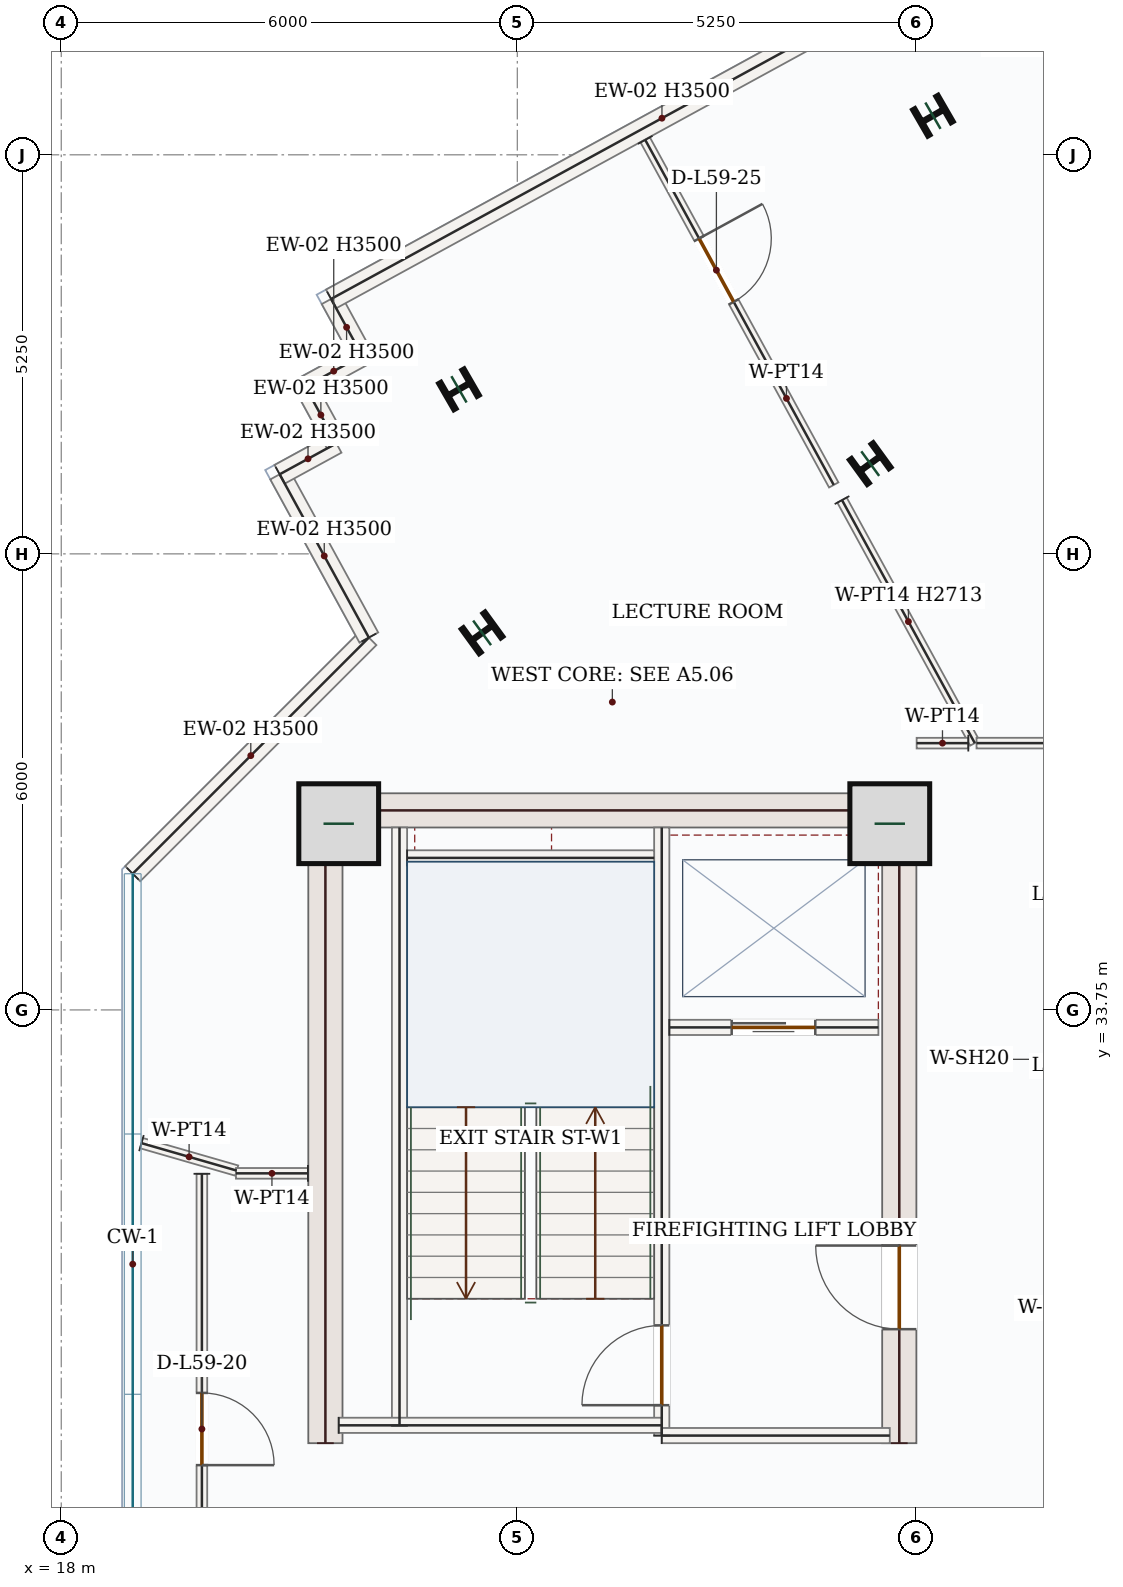
"""IFC4 building model, lengths in metres.
Left out: names, types, materials, properties, quantities, classifications, styles, units other than length and angle.
Written with IfcOpenShell. Run it as: python <this file> out.ifc"""

import sys

from ifc_helpers import new_model, si_unit, direction, frame, frame_2d, origin, origin_2d, place, context, subcontext, project, spatial, rectangle, i_section, extrude, source, transform, mapped, element, fill, save


model = new_model("IFC4")
c1 = context("Model", 3, precision=1e-05, world=origin(), true_north=direction((0.0, 1.0)))
c2 = subcontext(c1, "Body", "Model", "MODEL_VIEW")
j1 = project(units=[si_unit("LENGTHUNIT", "METRE"), si_unit("PLANEANGLEUNIT", "RADIAN")], contexts=[c1])
p1 = place(None, origin())
s1 = spatial("IfcSite", under=j1, at=p1, CompositionType="ELEMENT")
p2 = place(p1, origin())
s2 = spatial("IfcBuilding", under=s1, at=p2, CompositionType="ELEMENT")
p3 = place(p2, frame((0.0, 0.0, 250.35)))
s3 = spatial("IfcBuildingStorey", under=s2, at=p3, CompositionType="ELEMENT", Elevation=250.35)
m1 = source(origin(), c2, "Body", "SweptSolid", [
    extrude(rectangle(XDim=8.55, YDim=0.45, at=frame_2d((4.275, 0.0))), origin(), (0.0, 0.0, 1.0), 3.5),
])
p4 = place(p3, frame((21.475, 28.05, 0.0), z_axis=(0.0, 0.0, 1.0), x_axis=(0.0, 1.0, 0.0)))
e1 = element("IfcWall", 1, at=p4, inside=s3, PredefinedType="SHEAR", context=c2, shape_type="MappedRepresentation", body=[
    mapped(m1, transform((0.0, 0.0, 0.0), x_axis=(1.0, 0.0, 0.0), y_axis=(0.0, 1.0, 0.0), z_axis=(0.0, 0.0, 1.0), scale=1.0)),
])
p5 = place(p3, frame((29.025, 28.05, 0.0), z_axis=(0.0, 0.0, 1.0), x_axis=(0.0, 1.0, 0.0)))
e2 = element("IfcWall", 2, at=p5, inside=s3, PredefinedType="SHEAR", context=c2, shape_type="SweptSolid", body=[
    extrude(rectangle(XDim=8.55, YDim=0.45, at=frame_2d((4.275, 0.0))), origin(), (0.0, 0.0, 1.0), 3.5),
])
p6 = place(p5, frame((1.5, 0.0, 0.0)))
e3 = element("IfcOpeningElement", 3, at=p6, cuts=e2, PredefinedType="OPENING", context=c2, shape_type="SweptSolid", body=[
    extrude(rectangle(XDim=1.1, YDim=2.2, at=frame_2d((0.55, 1.1))), frame((0.0, 0.235, 0.0), z_axis=(0.0, -1.0, 0.0), x_axis=(1.0, 0.0, 0.0)), (0.0, 0.0, 1.0), 0.47),
])
m2 = source(origin(), c2, "Body", "SweptSolid", [
    extrude(rectangle(XDim=7.1, YDim=0.45, at=frame_2d((3.55, 0.0))), origin(), (0.0, 0.0, 1.0), 3.5),
])
p7 = place(p3, frame((21.7, 36.375, 0.0), z_axis=(0.0, 0.0, 1.0), x_axis=(1.0, 0.0, 0.0)))
e4 = element("IfcWall", 4, at=p7, inside=s3, PredefinedType="SHEAR", context=c2, shape_type="MappedRepresentation", body=[
    mapped(m2, transform((0.0, 0.0, 0.0), x_axis=(1.0, 0.0, 0.0), y_axis=(0.0, 1.0, 0.0), z_axis=(0.0, 0.0, 1.0), scale=1.0)),
])
m3 = source(origin(), c2, "Body", "SweptSolid", [
    extrude(rectangle(XDim=1.05, YDim=1.05, at=origin_2d()), origin(), (0.0, 0.0, 1.0), 3.75),
])
for number, where, z_axis, x_axis in (
    (5, (21.65, 36.2, 0.0), (0.0, 0.0, 1.0), (1.0, 0.0, 0.0)),
    (6, (28.9, 36.2, 0.0), (0.0, 0.0, 1.0), (1.0, 0.0, 0.0)),
):
    element("IfcColumn", number, at=place(p3, frame(where, z_axis=z_axis, x_axis=x_axis)), inside=s3, PredefinedType="COLUMN", context=c2, shape_type="MappedRepresentation", body=[
        mapped(m3, transform((0.0, 0.0, 0.0), x_axis=(1.0, 0.0, 0.0), y_axis=(0.0, 1.0, 0.0), z_axis=(0.0, 0.0, 1.0), scale=1.0)),
    ])
m4 = source(origin(), c2, "Body", "SweptSolid", [
    extrude(i_section(OverallWidth=0.399, OverallDepth=0.386, WebThickness=0.021, FlangeThickness=0.033, FilletRadius=0.018, at=origin_2d()), origin(), (0.0, 0.0, 1.0), 3.75),
])
for number, where, z_axis, x_axis in (
    (7, (28.643, 40.937, 0.0), (0.0, 0.0, 1.0), (-0.588, 0.809, 0.0)),
    (8, (23.536, 38.711, 0.0), (0.0, 0.0, 1.0), (-0.588, 0.809, 0.0)),
    (9, (29.468, 45.514, 0.0), (0.0, 0.0, 1.0), (-0.5, 0.866, 0.0)),
    (10, (23.232, 41.914, 0.0), (0.0, 0.0, 1.0), (-0.5, 0.866, 0.0)),
):
    element("IfcColumn", number, at=place(p3, frame(where, z_axis=z_axis, x_axis=x_axis)), inside=s3, PredefinedType="COLUMN", context=c2, shape_type="MappedRepresentation", body=[
        mapped(m4, transform((0.0, 0.0, 0.0), x_axis=(1.0, 0.0, 0.0), y_axis=(0.0, 1.0, 0.0), z_axis=(0.0, 0.0, 1.0), scale=1.0)),
    ])
m5 = source(origin(), c2, "Body", "SweptSolid", [
    extrude(rectangle(XDim=4.394, YDim=0.28, at=frame_2d((2.197, 0.0))), origin(), (0.0, 0.0, 1.0), 3.5),
])
p8 = place(p3, frame((18.94, 35.542, 0.0), z_axis=(0.0, 0.0, 1.0), x_axis=(0.707106781187, 0.707106781187, 0.0)))
e11 = element("IfcWall", 11, at=p8, inside=s3, PredefinedType="SOLIDWALL", context=c2, shape_type="MappedRepresentation", body=[
    mapped(m5, transform((0.0, 0.0, 0.0), x_axis=(1.0, 0.0, 0.0), y_axis=(0.0, 1.0, 0.0), z_axis=(0.0, 0.0, 1.0), scale=1.0)),
])
m6 = source(origin(), c2, "Body", "SweptSolid", [
    extrude(rectangle(XDim=2.448, YDim=0.28, at=frame_2d((1.224, 0.0))), origin(), (0.0, 0.0, 1.0), 3.5),
])
p9 = place(p3, frame((22.047, 38.649, 0.0), z_axis=(0.0, 0.0, 1.0), x_axis=(-0.47951595933, 0.877533158774, 0.0)))
e12 = element("IfcWall", 12, at=p9, inside=s3, PredefinedType="SOLIDWALL", context=c2, shape_type="MappedRepresentation", body=[
    mapped(m6, transform((0.0, 0.0, 0.0), x_axis=(1.0, 0.0, 0.0), y_axis=(0.0, 1.0, 0.0), z_axis=(0.0, 0.0, 1.0), scale=1.0)),
])
m7 = source(origin(), c2, "Body", "SweptSolid", [
    extrude(rectangle(XDim=0.85, YDim=0.28, at=frame_2d((0.425, 0.0))), origin(), (0.0, 0.0, 1.0), 3.5),
])
p10 = place(p3, frame((20.873, 40.796, 0.0), z_axis=(0.0, 0.0, 1.0), x_axis=(0.87752219781, 0.479536017782, 0.0)))
e13 = element("IfcWall", 13, at=p10, inside=s3, PredefinedType="SOLIDWALL", context=c2, shape_type="MappedRepresentation", body=[
    mapped(m7, transform((0.0, 0.0, 0.0), x_axis=(1.0, 0.0, 0.0), y_axis=(0.0, 1.0, 0.0), z_axis=(0.0, 0.0, 1.0), scale=1.0)),
])
m8 = source(origin(), c2, "Body", "SweptSolid", [
    extrude(rectangle(XDim=0.85, YDim=0.28, at=frame_2d((0.425, 0.0))), origin(), (0.0, 0.0, 1.0), 3.5),
])
for number, where, z_axis, x_axis in (
    (14, (21.619, 41.204, 0.0), (0.0, 0.0, 1.0), (-0.48, 0.877, 0.0)),
    (15, (21.211, 41.95, 0.0), (0.0, 0.0, 1.0), (0.878, 0.479, 0.0)),
):
    element("IfcWall", number, at=place(p3, frame(where, z_axis=z_axis, x_axis=x_axis)), inside=s3, PredefinedType="SOLIDWALL", context=c2, shape_type="MappedRepresentation", body=[
        mapped(m8, transform((0.0, 0.0, 0.0), x_axis=(1.0, 0.0, 0.0), y_axis=(0.0, 1.0, 0.0), z_axis=(0.0, 0.0, 1.0), scale=1.0)),
    ])
p11 = place(p3, frame((21.958, 42.357, 0.0), z_axis=(0.0, 0.0, 1.0), x_axis=(-0.479536017782, 0.87752219781, 0.0)))
e16 = element("IfcWall", 16, at=p11, inside=s3, PredefinedType="SOLIDWALL", context=c2, shape_type="MappedRepresentation", body=[
    mapped(m7, transform((0.0, 0.0, 0.0), x_axis=(1.0, 0.0, 0.0), y_axis=(0.0, 1.0, 0.0), z_axis=(0.0, 0.0, 1.0), scale=1.0)),
])
m9 = source(origin(), c2, "Body", "SweptSolid", [
    extrude(rectangle(XDim=9.92, YDim=0.28, at=frame_2d((4.96, 0.0))), origin(), (0.0, 0.0, 1.0), 3.5),
])
p12 = place(p3, frame((21.55, 43.104, 0.0), z_axis=(0.0, 0.0, 1.0), x_axis=(0.877572768104, 0.479443465574, 0.0)))
e17 = element("IfcWall", 17, at=p12, inside=s3, PredefinedType="SOLIDWALL", context=c2, shape_type="MappedRepresentation", body=[
    mapped(m9, transform((0.0, 0.0, 0.0), x_axis=(1.0, 0.0, 0.0), y_axis=(0.0, 1.0, 0.0), z_axis=(0.0, 0.0, 1.0), scale=1.0)),
])
m10 = source(origin(), c2, "Body", "SweptSolid", [
    extrude(rectangle(XDim=7.87, YDim=0.2, at=frame_2d((3.935, 0.0))), origin(), (0.0, 0.0, 1.0), 3.5),
])
p13 = place(p3, frame((22.45, 28.28, 0.0), z_axis=(0.0, 0.0, 1.0), x_axis=(0.0, 1.0, 0.0)))
e18 = element("IfcWall", 18, at=p13, inside=s3, PredefinedType="SOLIDWALL", context=c2, shape_type="MappedRepresentation", body=[
    mapped(m10, transform((0.0, 0.0, 0.0), x_axis=(1.0, 0.0, 0.0), y_axis=(0.0, 1.0, 0.0), z_axis=(0.0, 0.0, 1.0), scale=1.0)),
])
p14 = place(p3, frame((25.9, 28.15, 0.0), z_axis=(0.0, 0.0, 1.0), x_axis=(0.0, 1.0, 0.0)))
e19 = element("IfcWall", 19, at=p14, inside=s3, PredefinedType="SOLIDWALL", context=c2, shape_type="SweptSolid", body=[
    extrude(rectangle(XDim=8.0, YDim=0.2, at=frame_2d((4.0, 0.0))), origin(), (0.0, 0.0, 1.0), 3.5),
])
p15 = place(p14, frame((0.4, 0.0, 0.0)))
e20 = element("IfcOpeningElement", 20, at=p15, cuts=e19, PredefinedType="OPENING", context=c2, shape_type="SweptSolid", body=[
    extrude(rectangle(XDim=1.05, YDim=2.15, at=frame_2d((0.525, 1.075))), frame((0.0, 0.11, 0.0), z_axis=(0.0, -1.0, 0.0), x_axis=(1.0, 0.0, 0.0)), (0.0, 0.0, 1.0), 0.22),
])
m11 = source(origin(), c2, "Body", "SweptSolid", [
    extrude(rectangle(XDim=4.25, YDim=0.2, at=frame_2d((2.125, 0.0))), origin(), (0.0, 0.0, 1.0), 3.5),
])
p16 = place(p3, frame((21.65, 28.285, 0.0), z_axis=(0.0, 0.0, 1.0), x_axis=(1.0, 0.0, 0.0)))
e21 = element("IfcWall", 21, at=p16, inside=s3, PredefinedType="SOLIDWALL", context=c2, shape_type="MappedRepresentation", body=[
    mapped(m11, transform((0.0, 0.0, 0.0), x_axis=(1.0, 0.0, 0.0), y_axis=(0.0, 1.0, 0.0), z_axis=(0.0, 0.0, 1.0), scale=1.0)),
])
m12 = source(origin(), c2, "Body", "SweptSolid", [
    extrude(rectangle(XDim=3.0, YDim=0.2, at=frame_2d((1.5, 0.0))), origin(), (0.0, 0.0, 1.0), 3.5),
])
p17 = place(p3, frame((25.9, 28.15, 0.0), z_axis=(0.0, 0.0, 1.0), x_axis=(1.0, 0.0, 0.0)))
e22 = element("IfcWall", 22, at=p17, inside=s3, PredefinedType="SOLIDWALL", context=c2, shape_type="MappedRepresentation", body=[
    mapped(m12, transform((0.0, 0.0, 0.0), x_axis=(1.0, 0.0, 0.0), y_axis=(0.0, 1.0, 0.0), z_axis=(0.0, 0.0, 1.0), scale=1.0)),
])
m13 = source(origin(), c2, "Body", "SweptSolid", [
    extrude(rectangle(XDim=3.25, YDim=0.2, at=frame_2d((1.625, 0.0))), origin(), (0.0, 0.0, 1.0), 3.5),
])
p18 = place(p3, frame((22.55, 35.75, 0.0), z_axis=(0.0, 0.0, 1.0), x_axis=(1.0, 0.0, 0.0)))
e23 = element("IfcWall", 23, at=p18, inside=s3, PredefinedType="SOLIDWALL", context=c2, shape_type="MappedRepresentation", body=[
    mapped(m13, transform((0.0, 0.0, 0.0), x_axis=(1.0, 0.0, 0.0), y_axis=(0.0, 1.0, 0.0), z_axis=(0.0, 0.0, 1.0), scale=1.0)),
])
p19 = place(p3, frame((26.0, 33.52, 0.0), z_axis=(0.0, 0.0, 1.0), x_axis=(1.0, 0.0, 0.0)))
e24 = element("IfcWall", 24, at=p19, inside=s3, PredefinedType="SOLIDWALL", context=c2, shape_type="SweptSolid", body=[
    extrude(rectangle(XDim=2.75, YDim=0.2, at=frame_2d((1.375, 0.0))), origin(), (0.0, 0.0, 1.0), 3.5),
])
p20 = place(p19, frame((0.82, 0.0, 0.0)))
e25 = element("IfcOpeningElement", 25, at=p20, cuts=e24, PredefinedType="OPENING", context=c2, shape_type="SweptSolid", body=[
    extrude(rectangle(XDim=1.1, YDim=2.15, at=frame_2d((0.55, 1.075))), frame((0.0, 0.11, 0.0), z_axis=(0.0, -1.0, 0.0), x_axis=(1.0, 0.0, 0.0)), (0.0, 0.0, 1.0), 0.22),
])
m14 = source(origin(), c2, "Body", "SweptSolid", [
    extrude(rectangle(XDim=1.305, YDim=0.14, at=frame_2d((0.652, 0.0))), origin(), (0.0, 0.0, 1.0), 3.5),
])
p21 = place(p3, frame((19.055, 31.998, 0.0), z_axis=(0.0, 0.0, 1.0), x_axis=(0.960836047515, -0.2771174657, 0.0)))
e26 = element("IfcWall", 26, at=p21, inside=s3, PredefinedType="PARTITIONING", context=c2, shape_type="MappedRepresentation", body=[
    mapped(m14, transform((0.0, 0.0, 0.0), x_axis=(1.0, 0.0, 0.0), y_axis=(0.0, 1.0, 0.0), z_axis=(0.0, 0.0, 1.0), scale=1.0)),
])
p22 = place(p3, frame((19.85, 31.594, 0.0), z_axis=(0.0, 0.0, 1.0), x_axis=(2.657666e-05, -0.999999999647, 0.0)))
e27 = element("IfcWall", 27, at=p22, inside=s3, PredefinedType="PARTITIONING", context=c2, shape_type="SweptSolid", body=[
    extrude(rectangle(XDim=9.186, YDim=0.14, at=frame_2d((4.593, 0.0))), origin(), (0.0, 0.0, 1.0), 3.5),
])
p23 = place(p22, frame((2.883, 0.0, 0.0)))
e28 = element("IfcOpeningElement", 28, at=p23, cuts=e27, PredefinedType="OPENING", context=c2, shape_type="SweptSolid", body=[
    extrude(rectangle(XDim=0.95, YDim=2.15, at=frame_2d((0.475, 1.075))), frame((0.0, 0.08, 0.0), z_axis=(0.0, -1.0, 0.0), x_axis=(1.0, 0.0, 0.0)), (0.0, 0.0, 1.0), 0.16),
])
p24 = place(p3, frame((25.683, 45.196, 0.0), z_axis=(0.0, 0.0, 1.0), x_axis=(0.479427410708, -0.877581539153, 0.0)))
e29 = element("IfcWall", 29, at=p24, inside=s3, PredefinedType="PARTITIONING", context=c2, shape_type="SweptSolid", body=[
    extrude(rectangle(XDim=5.173, YDim=0.14, at=frame_2d((2.586, 0.0))), origin(), (0.0, 0.0, 1.0), 3.5),
])
p25 = place(p24, frame((1.478, 0.0, 0.0)))
e30 = element("IfcOpeningElement", 30, at=p25, cuts=e29, PredefinedType="OPENING", context=c2, shape_type="SweptSolid", body=[
    extrude(rectangle(XDim=0.95, YDim=2.15, at=frame_2d((0.475, 1.075))), frame((0.0, 0.08, 0.0), z_axis=(0.0, -1.0, 0.0), x_axis=(1.0, 0.0, 0.0)), (0.0, 0.0, 1.0), 0.16),
])
m15 = source(origin(), c2, "Body", "SweptSolid", [
    extrude(rectangle(XDim=3.644, YDim=0.14, at=frame_2d((1.822, 0.0))), origin(), (0.0, 0.0, 1.0), 2.713),
])
p26 = place(p3, frame((28.271, 40.457, 0.0), z_axis=(0.0, 0.0, 1.0), x_axis=(0.479509272429, -0.877536812706, 0.0)))
e31 = element("IfcWall", 31, at=p26, inside=s3, PredefinedType="PARTITIONING", context=c2, shape_type="MappedRepresentation", body=[
    mapped(m15, transform((0.0, 0.0, 0.0), x_axis=(1.0, 0.0, 0.0), y_axis=(0.0, 1.0, 0.0), z_axis=(0.0, 0.0, 1.0), scale=1.0)),
])
m16 = source(origin(), c2, "Body", "SweptSolid", [
    extrude(rectangle(XDim=0.68, YDim=0.14, at=frame_2d((0.34, 0.0))), origin(), (0.0, 0.0, 1.0), 3.5),
])
p27 = place(p3, frame((29.933, 37.26, 0.0), z_axis=(0.0, 0.0, 1.0), x_axis=(-0.999999741957, -0.000718390619, 0.0)))
e32 = element("IfcWall", 32, at=p27, inside=s3, PredefinedType="PARTITIONING", context=c2, shape_type="MappedRepresentation", body=[
    mapped(m16, transform((0.0, 0.0, 0.0), x_axis=(1.0, 0.0, 0.0), y_axis=(0.0, 1.0, 0.0), z_axis=(0.0, 0.0, 1.0), scale=1.0)),
])
m17 = source(origin(), c2, "Body", "SweptSolid", [
    extrude(rectangle(XDim=0.947, YDim=0.14, at=frame_2d((0.474, 0.0))), origin(), (0.0, 0.0, 1.0), 3.5),
])
p28 = place(p3, frame((21.245, 31.6, 0.0), z_axis=(0.0, 0.0, 1.0), x_axis=(-1.0, 0.0, 0.0)))
e33 = element("IfcWall", 33, at=p28, inside=s3, PredefinedType="PARTITIONING", context=c2, shape_type="MappedRepresentation", body=[
    mapped(m17, transform((0.0, 0.0, 0.0), x_axis=(1.0, 0.0, 0.0), y_axis=(0.0, 1.0, 0.0), z_axis=(0.0, 0.0, 1.0), scale=1.0)),
])
p29 = place(p3, frame((38.998, 37.26, 0.0), z_axis=(0.0, 0.0, 1.0), x_axis=(-1.0, 0.0, 0.0)))
e34 = element("IfcWall", 34, at=p29, inside=s3, PredefinedType="PARTITIONING", context=c2, shape_type="SweptSolid", body=[
    extrude(rectangle(XDim=8.956, YDim=0.14, at=frame_2d((4.478, 0.0))), origin(), (0.0, 0.0, 1.0), 3.5),
])
p30 = place(p29, frame((2.802, 0.0, 0.0)))
e35 = element("IfcOpeningElement", 35, at=p30, cuts=e34, PredefinedType="OPENING", context=c2, shape_type="SweptSolid", body=[
    extrude(rectangle(XDim=0.95, YDim=2.15, at=frame_2d((0.475, 1.075))), frame((0.0, 0.08, 0.0), z_axis=(0.0, -1.0, 0.0), x_axis=(1.0, 0.0, 0.0)), (0.0, 0.0, 1.0), 0.16),
])
m18 = source(origin(), c2, "Body", "SweptSolid", [
    extrude(rectangle(XDim=1.05, YDim=2.15, at=frame_2d((0.525, 1.075))), frame((0.0, 0.025, 0.0), z_axis=(0.0, -1.0, 0.0), x_axis=(1.0, 0.0, 0.0)), (0.0, 0.0, 1.0), 0.05),
])
p31 = place(p15, origin())
e36 = element("IfcDoor", 36, at=p31, inside=s3, OperationType="SINGLE_SWING_LEFT", PredefinedType="DOOR", context=c2, shape_type="MappedRepresentation", body=[
    mapped(m18, transform((0.0, 0.0, 0.0), x_axis=(1.0, 0.0, 0.0), y_axis=(0.0, 1.0, 0.0), z_axis=(0.0, 0.0, 1.0), scale=1.0)),
])
fill(e20, e36)
m19 = source(origin(), c2, "Body", "SweptSolid", [
    extrude(rectangle(XDim=1.1, YDim=2.15, at=frame_2d((0.55, 1.075))), frame((0.0, 0.025, 0.0), z_axis=(0.0, -1.0, 0.0), x_axis=(1.0, 0.0, 0.0)), (0.0, 0.0, 1.0), 0.05),
])
p32 = place(p20, origin())
e37 = element("IfcDoor", 37, at=p32, inside=s3, OperationType="DOUBLE_DOOR_SLIDING", PredefinedType="DOOR", context=c2, shape_type="MappedRepresentation", body=[
    mapped(m19, transform((0.0, 0.0, 0.0), x_axis=(1.0, 0.0, 0.0), y_axis=(0.0, 1.0, 0.0), z_axis=(0.0, 0.0, 1.0), scale=1.0)),
])
fill(e25, e37)
m20 = source(origin(), c2, "Body", "SweptSolid", [
    extrude(rectangle(XDim=1.1, YDim=2.2, at=frame_2d((0.55, 1.1))), frame((0.0, 0.025, 0.0), z_axis=(0.0, -1.0, 0.0), x_axis=(1.0, 0.0, 0.0)), (0.0, 0.0, 1.0), 0.05),
])
p33 = place(p6, origin())
e38 = element("IfcDoor", 38, at=p33, inside=s3, OperationType="SINGLE_SWING_RIGHT", PredefinedType="DOOR", context=c2, shape_type="MappedRepresentation", body=[
    mapped(m20, transform((0.0, 0.0, 0.0), x_axis=(1.0, 0.0, 0.0), y_axis=(0.0, 1.0, 0.0), z_axis=(0.0, 0.0, 1.0), scale=1.0)),
])
fill(e3, e38)
m21 = source(origin(), c2, "Body", "SweptSolid", [
    extrude(rectangle(XDim=0.95, YDim=2.15, at=frame_2d((0.475, 1.075))), frame((0.0, 0.025, 0.0), z_axis=(0.0, -1.0, 0.0), x_axis=(1.0, 0.0, 0.0)), (0.0, 0.0, 1.0), 0.05),
])
p34 = place(p23, origin())
e39 = element("IfcDoor", 39, at=p34, inside=s3, OperationType="SINGLE_SWING_RIGHT", PredefinedType="DOOR", context=c2, shape_type="MappedRepresentation", body=[
    mapped(m21, transform((0.0, 0.0, 0.0), x_axis=(1.0, 0.0, 0.0), y_axis=(0.0, 1.0, 0.0), z_axis=(0.0, 0.0, 1.0), scale=1.0)),
])
fill(e28, e39)
p35 = place(p25, origin())
e40 = element("IfcDoor", 40, at=p35, inside=s3, OperationType="SINGLE_SWING_LEFT", PredefinedType="DOOR", context=c2, shape_type="MappedRepresentation", body=[
    mapped(m21, transform((0.0, 0.0, 0.0), x_axis=(1.0, 0.0, 0.0), y_axis=(0.0, 1.0, 0.0), z_axis=(0.0, 0.0, 1.0), scale=1.0)),
])
fill(e30, e40)
save(model, sys.argv[1])
